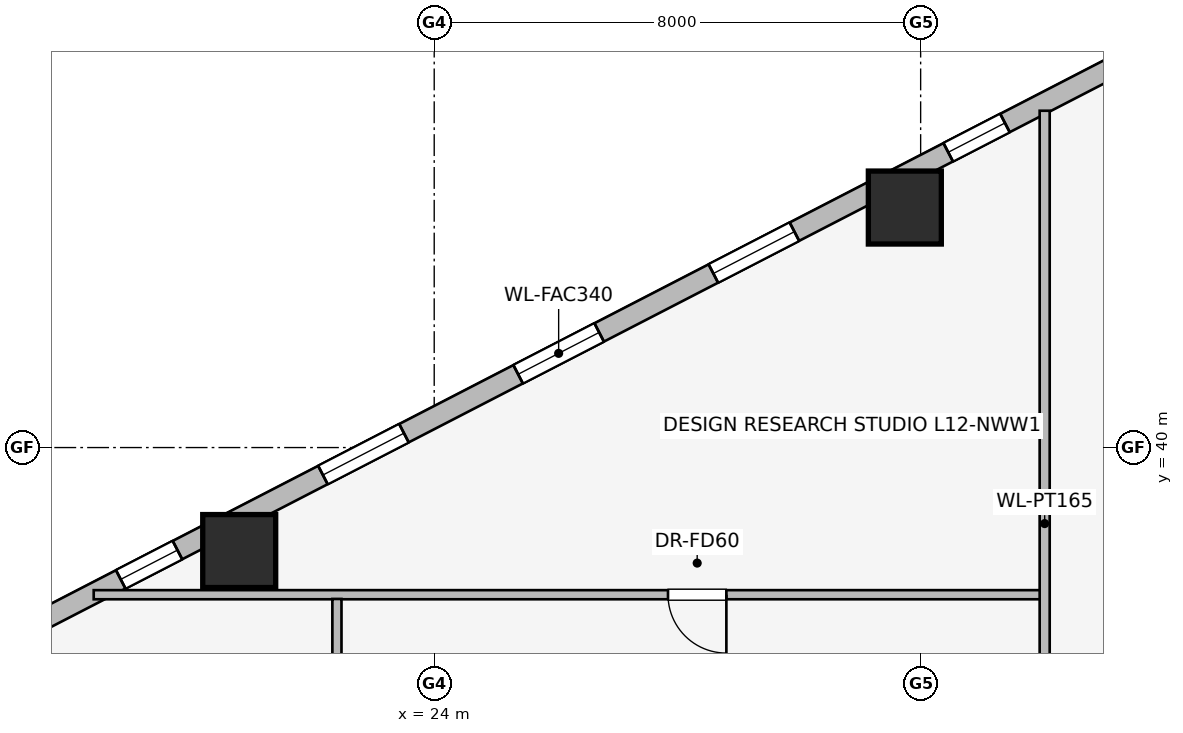
"""IFC4 building model, lengths in metres.
Left out: names, types, materials, properties, quantities, classifications, styles, units other than length and angle.
Written with IfcOpenShell. Run it as: python <this file> out.ifc"""

import sys

from ifc_helpers import new_model, si_unit, direction, frame, frame_2d, origin, origin_2d, place, context, subcontext, project, spatial, rectangle, extrude, element, fill, save


model = new_model("IFC4")
c1 = context("Model", 3, precision=1e-05, world=origin(), true_north=direction((0.0, 1.0)))
c2 = subcontext(c1, "Body", "Model", "MODEL_VIEW")
j1 = project(units=[si_unit("LENGTHUNIT", "METRE"), si_unit("PLANEANGLEUNIT", "RADIAN")], contexts=[c1])
p1 = place(None, origin())
s1 = spatial("IfcSite", under=j1, at=p1, CompositionType="ELEMENT")
p2 = place(p1, origin())
s2 = spatial("IfcBuilding", under=s1, at=p2, CompositionType="ELEMENT")
p3 = place(p2, frame((0.0, 0.0, 48.9)))
s3 = spatial("IfcBuildingStorey", under=s2, at=p3, CompositionType="ELEMENT", Elevation=48.9)
for number, where, z_axis, x_axis in (
    (1, (31.74, 43.947, 0.0), (0.0, 0.0, 1.0), (1.0, 0.0, 0.0)),
    (2, (20.793, 38.298, 0.0), (0.0, 0.0, 1.0), (1.0, 0.0, 0.0)),
):
    element("IfcColumn", number, at=place(p3, frame(where, z_axis=z_axis, x_axis=x_axis)), inside=s3, PredefinedType="COLUMN", context=c2, shape_type="SweptSolid", body=[
        extrude(rectangle(XDim=1.2, YDim=1.2, at=origin_2d()), origin(), (0.0, 0.0, 1.0), 3.65),
    ])
p4 = place(p3, frame((16.924, 36.841, 0.0), z_axis=(0.0, 0.0, 1.0), x_axis=(0.888634413993, 0.458616264721, 0.0)))
e3 = element("IfcWall", 3, at=p4, inside=s3, PredefinedType="STANDARD", context=c2, shape_type="SweptSolid", body=[
    extrude(rectangle(XDim=20.531, YDim=0.34, at=frame_2d((10.266, 0.0))), origin(), (0.0, 0.0, 1.0), 2.654),
])
p5 = place(p4, frame((2.161, 0.0, 0.75)))
e4 = element("IfcOpeningElement", 4, at=p5, cuts=e3, PredefinedType="OPENING", context=c2, shape_type="SweptSolid", body=[
    extrude(rectangle(XDim=1.05, YDim=1.4, at=frame_2d((0.525, 0.7))), frame((0.0, 0.18, 0.0), z_axis=(0.0, -1.0, 0.0), x_axis=(1.0, 0.0, 0.0)), (0.0, 0.0, 1.0), 0.36),
])
p6 = place(p4, frame((5.903, 0.0, 0.75)))
e5 = element("IfcOpeningElement", 5, at=p6, cuts=e3, PredefinedType="OPENING", context=c2, shape_type="SweptSolid", body=[
    extrude(rectangle(XDim=1.5, YDim=1.5, at=frame_2d((0.75, 0.75))), frame((0.0, 0.18, 0.0), z_axis=(0.0, -1.0, 0.0), x_axis=(1.0, 0.0, 0.0)), (0.0, 0.0, 1.0), 0.36),
])
p7 = place(p4, frame((9.516, 0.0, 0.75)))
e6 = element("IfcOpeningElement", 6, at=p7, cuts=e3, PredefinedType="OPENING", context=c2, shape_type="SweptSolid", body=[
    extrude(rectangle(XDim=1.5, YDim=1.5, at=frame_2d((0.75, 0.75))), frame((0.0, 0.18, 0.0), z_axis=(0.0, -1.0, 0.0), x_axis=(1.0, 0.0, 0.0)), (0.0, 0.0, 1.0), 0.36),
])
p8 = place(p4, frame((13.129, 0.0, 0.75)))
e7 = element("IfcOpeningElement", 7, at=p8, cuts=e3, PredefinedType="OPENING", context=c2, shape_type="SweptSolid", body=[
    extrude(rectangle(XDim=1.5, YDim=1.5, at=frame_2d((0.75, 0.75))), frame((0.0, 0.18, 0.0), z_axis=(0.0, -1.0, 0.0), x_axis=(1.0, 0.0, 0.0)), (0.0, 0.0, 1.0), 0.36),
])
p9 = place(p4, frame((17.476, 0.0, 0.75)))
e8 = element("IfcOpeningElement", 8, at=p9, cuts=e3, PredefinedType="OPENING", context=c2, shape_type="SweptSolid", body=[
    extrude(rectangle(XDim=1.05, YDim=1.4, at=frame_2d((0.525, 0.7))), frame((0.0, 0.18, 0.0), z_axis=(0.0, -1.0, 0.0), x_axis=(1.0, 0.0, 0.0)), (0.0, 0.0, 1.0), 0.36),
])
p10 = place(p3, frame((34.0, 37.58, 0.0), z_axis=(0.0, 0.0, 1.0), x_axis=(-1.0, 0.0, 0.0)))
e9 = element("IfcWall", 9, at=p10, inside=s3, PredefinedType="PARTITIONING", context=c2, shape_type="SweptSolid", body=[
    extrude(rectangle(XDim=15.6, YDim=0.15, at=frame_2d((7.8, 0.0))), origin(), (0.0, 0.0, 1.0), 3.36),
])
p11 = place(p10, frame((5.195, 0.0, 0.0)))
e10 = element("IfcOpeningElement", 10, at=p11, cuts=e9, PredefinedType="OPENING", context=c2, shape_type="SweptSolid", body=[
    extrude(rectangle(XDim=0.96, YDim=2.0, at=frame_2d((0.48, 1.0))), frame((0.0, 0.085, 0.0), z_axis=(0.0, -1.0, 0.0), x_axis=(1.0, 0.0, 0.0)), (0.0, 0.0, 1.0), 0.17),
])
p12 = place(p3, frame((34.04, 31.96, 0.0), z_axis=(0.0, 0.0, 1.0), x_axis=(0.0, 1.0, 0.0)))
e11 = element("IfcWall", 11, at=p12, inside=s3, PredefinedType="PARTITIONING", context=c2, shape_type="SweptSolid", body=[
    extrude(rectangle(XDim=13.579, YDim=0.165, at=frame_2d((6.79, 0.0))), origin(), (0.0, 0.0, 1.0), 3.36),
])
p13 = place(p3, frame((22.4, 36.08, 0.0), z_axis=(0.0, 0.0, 1.0), x_axis=(0.0, 1.0, 0.0)))
e12 = element("IfcWall", 12, at=p13, inside=s3, PredefinedType="PARTITIONING", context=c2, shape_type="SweptSolid", body=[
    extrude(rectangle(XDim=1.43, YDim=0.15, at=frame_2d((0.715, 0.0))), origin(), (0.0, 0.0, 1.0), 3.36),
])
p14 = place(p5, origin())
e13 = element("IfcWindow", 13, at=p14, inside=s3, PartitioningType="SINGLE_PANEL", PredefinedType="WINDOW", context=c2, shape_type="SweptSolid", body=[
    extrude(rectangle(XDim=1.05, YDim=1.4, at=frame_2d((0.525, 0.7))), frame((0.0, 0.03, 0.0), z_axis=(0.0, -1.0, 0.0), x_axis=(1.0, 0.0, 0.0)), (0.0, 0.0, 1.0), 0.06),
])
fill(e4, e13)
p15 = place(p6, origin())
e14 = element("IfcWindow", 14, at=p15, inside=s3, PartitioningType="SINGLE_PANEL", PredefinedType="WINDOW", context=c2, shape_type="SweptSolid", body=[
    extrude(rectangle(XDim=1.5, YDim=1.5, at=frame_2d((0.75, 0.75))), frame((0.0, 0.03, 0.0), z_axis=(0.0, -1.0, 0.0), x_axis=(1.0, 0.0, 0.0)), (0.0, 0.0, 1.0), 0.06),
])
fill(e5, e14)
p16 = place(p7, origin())
e15 = element("IfcWindow", 15, at=p16, inside=s3, PartitioningType="SINGLE_PANEL", PredefinedType="WINDOW", context=c2, shape_type="SweptSolid", body=[
    extrude(rectangle(XDim=1.5, YDim=1.5, at=frame_2d((0.75, 0.75))), frame((0.0, 0.03, 0.0), z_axis=(0.0, -1.0, 0.0), x_axis=(1.0, 0.0, 0.0)), (0.0, 0.0, 1.0), 0.06),
])
fill(e6, e15)
p17 = place(p8, origin())
e16 = element("IfcWindow", 16, at=p17, inside=s3, PartitioningType="SINGLE_PANEL", PredefinedType="WINDOW", context=c2, shape_type="SweptSolid", body=[
    extrude(rectangle(XDim=1.5, YDim=1.5, at=frame_2d((0.75, 0.75))), frame((0.0, 0.03, 0.0), z_axis=(0.0, -1.0, 0.0), x_axis=(1.0, 0.0, 0.0)), (0.0, 0.0, 1.0), 0.06),
])
fill(e7, e16)
p18 = place(p9, origin())
e17 = element("IfcWindow", 17, at=p18, inside=s3, PartitioningType="SINGLE_PANEL", PredefinedType="WINDOW", context=c2, shape_type="SweptSolid", body=[
    extrude(rectangle(XDim=1.05, YDim=1.4, at=frame_2d((0.525, 0.7))), frame((0.0, 0.03, 0.0), z_axis=(0.0, -1.0, 0.0), x_axis=(1.0, 0.0, 0.0)), (0.0, 0.0, 1.0), 0.06),
])
fill(e8, e17)
p19 = place(p11, origin())
e18 = element("IfcDoor", 18, at=p19, inside=s3, OperationType="SINGLE_SWING_LEFT", PredefinedType="DOOR", context=c2, shape_type="SweptSolid", body=[
    extrude(rectangle(XDim=0.96, YDim=2.0, at=frame_2d((0.48, 1.0))), frame((0.0, 0.025, 0.0), z_axis=(0.0, -1.0, 0.0), x_axis=(1.0, 0.0, 0.0)), (0.0, 0.0, 1.0), 0.05),
])
fill(e10, e18)
save(model, sys.argv[1])
